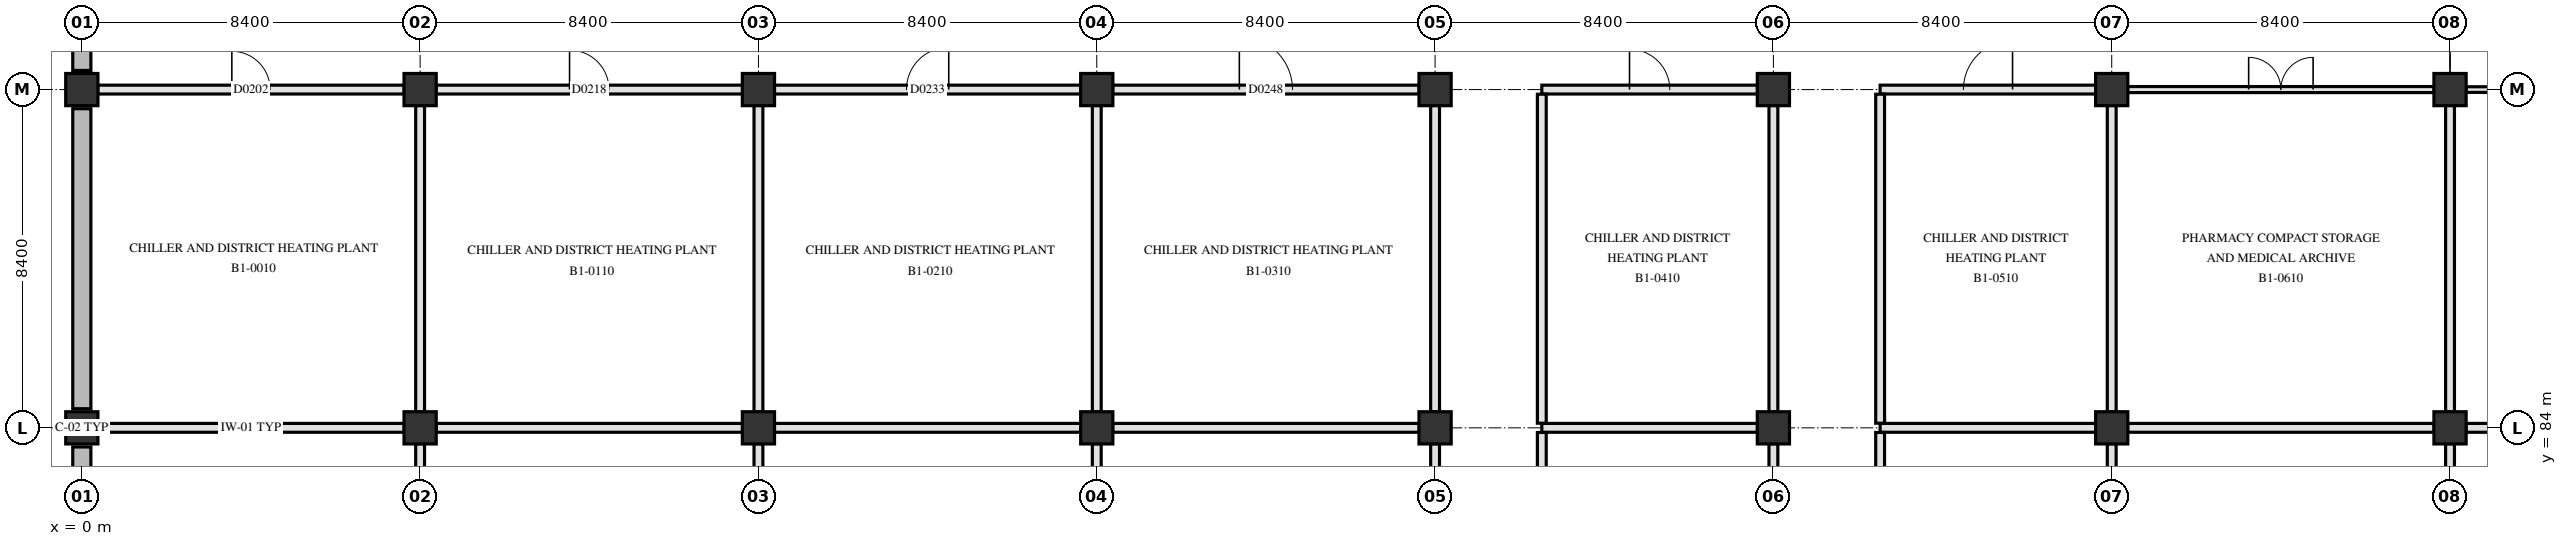
"""IFC4 building model, lengths in metres.
Left out: names, types, materials, properties, quantities, classifications, styles, units other than length and angle.
Written with IfcOpenShell. Run it as: python <this file> out.ifc"""

import sys

from ifc_helpers import new_model, si_unit, direction, frame, frame_2d, origin, origin_2d, place, context, subcontext, project, spatial, rectangle, extrude, element, fill, save


model = new_model("IFC4")
c1 = context("Model", 3, precision=1e-05, world=origin(), true_north=direction((0.0, 1.0)))
c2 = subcontext(c1, "Body", "Model", "MODEL_VIEW")
j1 = project(units=[si_unit("LENGTHUNIT", "METRE"), si_unit("PLANEANGLEUNIT", "RADIAN")], contexts=[c1])
p1 = place(None, origin())
s1 = spatial("IfcSite", under=j1, at=p1, CompositionType="ELEMENT")
p2 = place(p1, origin())
s2 = spatial("IfcBuilding", under=s1, at=p2, CompositionType="ELEMENT")
p3 = place(p2, frame((0.0, 0.0, -5.4)))
s3 = spatial("IfcBuildingStorey", under=s2, at=p3, CompositionType="ELEMENT", Elevation=-5.4)
for number, where, z_axis, x_axis in (
    (1, (0.0, 84.0, 0.0), (0.0, 0.0, 1.0), (1.0, 0.0, 0.0)),
    (2, (0.0, 92.4, 0.0), (0.0, 0.0, 1.0), (1.0, 0.0, 0.0)),
    (3, (8.4, 84.0, 0.0), (0.0, 0.0, 1.0), (1.0, 0.0, 0.0)),
    (4, (8.4, 92.4, 0.0), (0.0, 0.0, 1.0), (1.0, 0.0, 0.0)),
    (5, (16.8, 84.0, 0.0), (0.0, 0.0, 1.0), (1.0, 0.0, 0.0)),
    (6, (16.8, 92.4, 0.0), (0.0, 0.0, 1.0), (1.0, 0.0, 0.0)),
    (7, (25.2, 84.0, 0.0), (0.0, 0.0, 1.0), (1.0, 0.0, 0.0)),
    (8, (25.2, 92.4, 0.0), (0.0, 0.0, 1.0), (1.0, 0.0, 0.0)),
    (9, (33.6, 84.0, 0.0), (0.0, 0.0, 1.0), (1.0, 0.0, 0.0)),
    (10, (33.6, 92.4, 0.0), (0.0, 0.0, 1.0), (1.0, 0.0, 0.0)),
    (11, (42.0, 84.0, 0.0), (0.0, 0.0, 1.0), (1.0, 0.0, 0.0)),
    (12, (42.0, 92.4, 0.0), (0.0, 0.0, 1.0), (1.0, 0.0, 0.0)),
    (13, (50.4, 84.0, 0.0), (0.0, 0.0, 1.0), (1.0, 0.0, 0.0)),
    (14, (50.4, 92.4, 0.0), (0.0, 0.0, 1.0), (1.0, 0.0, 0.0)),
    (15, (58.8, 84.0, 0.0), (0.0, 0.0, 1.0), (1.0, 0.0, 0.0)),
    (16, (58.8, 92.4, 0.0), (0.0, 0.0, 1.0), (1.0, 0.0, 0.0)),
):
    element("IfcColumn", number, at=place(p3, frame(where, z_axis=z_axis, x_axis=x_axis)), inside=s3, PredefinedType="COLUMN", context=c2, shape_type="SweptSolid", body=[
        extrude(rectangle(XDim=0.8, YDim=0.8, at=origin_2d()), origin(), (0.0, 0.0, 1.0), 5.4),
    ])
for number, where, z_axis, x_axis in (
    (17, (0.0, 76.075, 0.0), (0.0, 0.0, 1.0), (0.0, 1.0, 0.0)),
    (18, (0.0, 84.475, 0.0), (0.0, 0.0, 1.0), (0.0, 1.0, 0.0)),
    (19, (0.0, 92.875, 0.0), (0.0, 0.0, 1.0), (0.0, 1.0, 0.0)),
):
    element("IfcWall", number, at=place(p3, frame(where, z_axis=z_axis, x_axis=x_axis)), inside=s3, PredefinedType="SOLIDWALL", context=c2, shape_type="SweptSolid", body=[
        extrude(rectangle(XDim=7.45, YDim=0.45, at=frame_2d((3.725, 0.0))), origin(), (0.0, 0.0, 1.0), 5.08),
    ])
p4 = place(p3, frame((0.395, 84.0, 0.0), z_axis=(0.0, 0.0, 1.0), x_axis=(1.0, 0.0, 0.0)))
e20 = element("IfcWall", 20, at=p4, inside=s3, PredefinedType="PARTITIONING", context=c2, shape_type="SweptSolid", body=[
    extrude(rectangle(XDim=7.61, YDim=0.22, at=frame_2d((3.805, 0.0))), origin(), (0.0, 0.0, 1.0), 4.42),
])
p5 = place(p3, frame((8.795, 84.0, 0.0), z_axis=(0.0, 0.0, 1.0), x_axis=(1.0, 0.0, 0.0)))
e21 = element("IfcWall", 21, at=p5, inside=s3, PredefinedType="PARTITIONING", context=c2, shape_type="SweptSolid", body=[
    extrude(rectangle(XDim=7.61, YDim=0.22, at=frame_2d((3.805, 0.0))), origin(), (0.0, 0.0, 1.0), 4.42),
])
p6 = place(p3, frame((17.195, 84.0, 0.0), z_axis=(0.0, 0.0, 1.0), x_axis=(1.0, 0.0, 0.0)))
e22 = element("IfcWall", 22, at=p6, inside=s3, PredefinedType="PARTITIONING", context=c2, shape_type="SweptSolid", body=[
    extrude(rectangle(XDim=7.61, YDim=0.22, at=frame_2d((3.805, 0.0))), origin(), (0.0, 0.0, 1.0), 4.42),
])
p7 = place(p3, frame((25.595, 84.0, 0.0), z_axis=(0.0, 0.0, 1.0), x_axis=(1.0, 0.0, 0.0)))
e23 = element("IfcWall", 23, at=p7, inside=s3, PredefinedType="PARTITIONING", context=c2, shape_type="SweptSolid", body=[
    extrude(rectangle(XDim=7.61, YDim=0.22, at=frame_2d((3.805, 0.0))), origin(), (0.0, 0.0, 1.0), 4.42),
])
for number, where, z_axis, x_axis in (
    (24, (36.25, 84.0, 0.0), (0.0, 0.0, 1.0), (1.0, 0.0, 0.0)),
    (25, (44.65, 84.0, 0.0), (0.0, 0.0, 1.0), (1.0, 0.0, 0.0)),
):
    element("IfcWall", number, at=place(p3, frame(where, z_axis=z_axis, x_axis=x_axis)), inside=s3, PredefinedType="PARTITIONING", context=c2, shape_type="SweptSolid", body=[
        extrude(rectangle(XDim=5.355, YDim=0.22, at=frame_2d((2.677, 0.0))), origin(), (0.0, 0.0, 1.0), 4.42),
    ])
p8 = place(p3, frame((50.795, 84.0, 0.0), z_axis=(0.0, 0.0, 1.0), x_axis=(1.0, 0.0, 0.0)))
e26 = element("IfcWall", 26, at=p8, inside=s3, PredefinedType="PARTITIONING", context=c2, shape_type="SweptSolid", body=[
    extrude(rectangle(XDim=7.61, YDim=0.22, at=frame_2d((3.805, 0.0))), origin(), (0.0, 0.0, 1.0), 4.42),
])
p9 = place(p3, frame((59.195, 84.0, 0.0), z_axis=(0.0, 0.0, 1.0), x_axis=(1.0, 0.0, 0.0)))
e27 = element("IfcWall", 27, at=p9, inside=s3, PredefinedType="PARTITIONING", context=c2, shape_type="SweptSolid", body=[
    extrude(rectangle(XDim=7.61, YDim=0.22, at=frame_2d((3.805, 0.0))), origin(), (0.0, 0.0, 1.0), 4.42),
])
p10 = place(p3, frame((0.395, 92.4, 0.0), z_axis=(0.0, 0.0, 1.0), x_axis=(1.0, 0.0, 0.0)))
e28 = element("IfcWall", 28, at=p10, inside=s3, PredefinedType="PARTITIONING", context=c2, shape_type="SweptSolid", body=[
    extrude(rectangle(XDim=7.61, YDim=0.22, at=frame_2d((3.805, 0.0))), origin(), (0.0, 0.0, 1.0), 4.42),
])
p11 = place(p10, frame((3.33, 0.0, 0.0)))
e29 = element("IfcOpeningElement", 29, at=p11, cuts=e28, PredefinedType="OPENING", context=c2, shape_type="SweptSolid", body=[
    extrude(rectangle(XDim=0.95, YDim=2.1, at=frame_2d((0.475, 1.05))), frame((0.0, 0.12, 0.0), z_axis=(0.0, -1.0, 0.0), x_axis=(1.0, 0.0, 0.0)), (0.0, 0.0, 1.0), 0.24),
])
p12 = place(p3, frame((8.795, 92.4, 0.0), z_axis=(0.0, 0.0, 1.0), x_axis=(1.0, 0.0, 0.0)))
e30 = element("IfcWall", 30, at=p12, inside=s3, PredefinedType="PARTITIONING", context=c2, shape_type="SweptSolid", body=[
    extrude(rectangle(XDim=7.61, YDim=0.22, at=frame_2d((3.805, 0.0))), origin(), (0.0, 0.0, 1.0), 4.42),
])
p13 = place(p12, frame((3.315, 0.0, 0.0)))
e31 = element("IfcOpeningElement", 31, at=p13, cuts=e30, PredefinedType="OPENING", context=c2, shape_type="SweptSolid", body=[
    extrude(rectangle(XDim=0.98, YDim=2.12, at=frame_2d((0.49, 1.06))), frame((0.0, 0.12, 0.0), z_axis=(0.0, -1.0, 0.0), x_axis=(1.0, 0.0, 0.0)), (0.0, 0.0, 1.0), 0.24),
])
p14 = place(p3, frame((17.195, 92.4, 0.0), z_axis=(0.0, 0.0, 1.0), x_axis=(1.0, 0.0, 0.0)))
e32 = element("IfcWall", 32, at=p14, inside=s3, PredefinedType="PARTITIONING", context=c2, shape_type="SweptSolid", body=[
    extrude(rectangle(XDim=7.61, YDim=0.22, at=frame_2d((3.805, 0.0))), origin(), (0.0, 0.0, 1.0), 4.42),
])
p15 = place(p14, frame((3.28, 0.0, 0.0)))
e33 = element("IfcOpeningElement", 33, at=p15, cuts=e32, PredefinedType="OPENING", context=c2, shape_type="SweptSolid", body=[
    extrude(rectangle(XDim=1.05, YDim=2.15, at=frame_2d((0.525, 1.075))), frame((0.0, 0.12, 0.0), z_axis=(0.0, -1.0, 0.0), x_axis=(1.0, 0.0, 0.0)), (0.0, 0.0, 1.0), 0.24),
])
p16 = place(p3, frame((25.595, 92.4, 0.0), z_axis=(0.0, 0.0, 1.0), x_axis=(1.0, 0.0, 0.0)))
e34 = element("IfcWall", 34, at=p16, inside=s3, PredefinedType="PARTITIONING", context=c2, shape_type="SweptSolid", body=[
    extrude(rectangle(XDim=7.61, YDim=0.22, at=frame_2d((3.805, 0.0))), origin(), (0.0, 0.0, 1.0), 4.42),
])
p17 = place(p16, frame((3.145, 0.0, 0.0)))
e35 = element("IfcOpeningElement", 35, at=p17, cuts=e34, PredefinedType="OPENING", context=c2, shape_type="SweptSolid", body=[
    extrude(rectangle(XDim=1.32, YDim=2.18, at=frame_2d((0.66, 1.09))), frame((0.0, 0.12, 0.0), z_axis=(0.0, -1.0, 0.0), x_axis=(1.0, 0.0, 0.0)), (0.0, 0.0, 1.0), 0.24),
])
p18 = place(p3, frame((36.25, 92.4, 0.0), z_axis=(0.0, 0.0, 1.0), x_axis=(1.0, 0.0, 0.0)))
e36 = element("IfcWall", 36, at=p18, inside=s3, PredefinedType="PARTITIONING", context=c2, shape_type="SweptSolid", body=[
    extrude(rectangle(XDim=5.355, YDim=0.22, at=frame_2d((2.677, 0.0))), origin(), (0.0, 0.0, 1.0), 4.42),
])
p19 = place(p18, frame((2.177, 0.0, 0.0)))
e37 = element("IfcOpeningElement", 37, at=p19, cuts=e36, PredefinedType="OPENING", context=c2, shape_type="SweptSolid", body=[
    extrude(rectangle(XDim=1.0, YDim=2.15, at=frame_2d((0.5, 1.075))), frame((0.0, 0.12, 0.0), z_axis=(0.0, -1.0, 0.0), x_axis=(1.0, 0.0, 0.0)), (0.0, 0.0, 1.0), 0.24),
])
p20 = place(p3, frame((44.65, 92.4, 0.0), z_axis=(0.0, 0.0, 1.0), x_axis=(1.0, 0.0, 0.0)))
e38 = element("IfcWall", 38, at=p20, inside=s3, PredefinedType="PARTITIONING", context=c2, shape_type="SweptSolid", body=[
    extrude(rectangle(XDim=5.355, YDim=0.22, at=frame_2d((2.677, 0.0))), origin(), (0.0, 0.0, 1.0), 4.42),
])
p21 = place(p20, frame((2.067, 0.0, 0.0)))
e39 = element("IfcOpeningElement", 39, at=p21, cuts=e38, PredefinedType="OPENING", context=c2, shape_type="SweptSolid", body=[
    extrude(rectangle(XDim=1.22, YDim=2.18, at=frame_2d((0.61, 1.09))), frame((0.0, 0.12, 0.0), z_axis=(0.0, -1.0, 0.0), x_axis=(1.0, 0.0, 0.0)), (0.0, 0.0, 1.0), 0.24),
])
p22 = place(p3, frame((50.795, 92.4, 0.0), z_axis=(0.0, 0.0, 1.0), x_axis=(1.0, 0.0, 0.0)))
e40 = element("IfcWall", 40, at=p22, inside=s3, PredefinedType="PARTITIONING", context=c2, shape_type="SweptSolid", body=[
    extrude(rectangle(XDim=7.61, YDim=0.15, at=frame_2d((3.805, 0.0))), origin(), (0.0, 0.0, 1.0), 4.42),
])
p23 = place(p22, frame((3.005, 0.0, 0.0)))
e41 = element("IfcOpeningElement", 41, at=p23, cuts=e40, PredefinedType="OPENING", context=c2, shape_type="SweptSolid", body=[
    extrude(rectangle(XDim=1.6, YDim=2.25, at=frame_2d((0.8, 1.125))), frame((0.0, 0.085, 0.0), z_axis=(0.0, -1.0, 0.0), x_axis=(1.0, 0.0, 0.0)), (0.0, 0.0, 1.0), 0.17),
])
p24 = place(p3, frame((59.195, 92.4, 0.0), z_axis=(0.0, 0.0, 1.0), x_axis=(1.0, 0.0, 0.0)))
e42 = element("IfcWall", 42, at=p24, inside=s3, PredefinedType="PARTITIONING", context=c2, shape_type="SweptSolid", body=[
    extrude(rectangle(XDim=7.56, YDim=0.14, at=frame_2d((3.78, 0.0))), origin(), (0.0, 0.0, 1.0), 4.42),
])
p25 = place(p24, frame((3.13, 0.0, 0.0)))
e43 = element("IfcOpeningElement", 43, at=p25, cuts=e42, PredefinedType="OPENING", context=c2, shape_type="SweptSolid", body=[
    extrude(rectangle(XDim=1.3, YDim=2.2, at=frame_2d((0.65, 1.1))), frame((0.0, 0.08, 0.0), z_axis=(0.0, -1.0, 0.0), x_axis=(1.0, 0.0, 0.0)), (0.0, 0.0, 1.0), 0.16),
])
p26 = place(p3, frame((8.4, 78.315, 0.0), z_axis=(0.0, 0.0, 1.0), x_axis=(0.0, 1.0, 0.0)))
e44 = element("IfcWall", 44, at=p26, inside=s3, PredefinedType="PARTITIONING", context=c2, shape_type="SweptSolid", body=[
    extrude(rectangle(XDim=5.29, YDim=0.22, at=frame_2d((2.645, 0.0))), origin(), (0.0, 0.0, 1.0), 4.47),
])
p27 = place(p3, frame((8.4, 84.395, 0.0), z_axis=(0.0, 0.0, 1.0), x_axis=(0.0, 1.0, 0.0)))
e45 = element("IfcWall", 45, at=p27, inside=s3, PredefinedType="PARTITIONING", context=c2, shape_type="SweptSolid", body=[
    extrude(rectangle(XDim=7.61, YDim=0.22, at=frame_2d((3.805, 0.0))), origin(), (0.0, 0.0, 1.0), 4.47),
])
p28 = place(p3, frame((16.8, 78.315, 0.0), z_axis=(0.0, 0.0, 1.0), x_axis=(0.0, 1.0, 0.0)))
e46 = element("IfcWall", 46, at=p28, inside=s3, PredefinedType="PARTITIONING", context=c2, shape_type="SweptSolid", body=[
    extrude(rectangle(XDim=5.29, YDim=0.22, at=frame_2d((2.645, 0.0))), origin(), (0.0, 0.0, 1.0), 4.47),
])
p29 = place(p3, frame((16.8, 84.395, 0.0), z_axis=(0.0, 0.0, 1.0), x_axis=(0.0, 1.0, 0.0)))
e47 = element("IfcWall", 47, at=p29, inside=s3, PredefinedType="PARTITIONING", context=c2, shape_type="SweptSolid", body=[
    extrude(rectangle(XDim=7.61, YDim=0.22, at=frame_2d((3.805, 0.0))), origin(), (0.0, 0.0, 1.0), 4.47),
])
p30 = place(p3, frame((25.2, 78.315, 0.0), z_axis=(0.0, 0.0, 1.0), x_axis=(0.0, 1.0, 0.0)))
e48 = element("IfcWall", 48, at=p30, inside=s3, PredefinedType="PARTITIONING", context=c2, shape_type="SweptSolid", body=[
    extrude(rectangle(XDim=5.29, YDim=0.22, at=frame_2d((2.645, 0.0))), origin(), (0.0, 0.0, 1.0), 4.47),
])
p31 = place(p3, frame((25.2, 84.395, 0.0), z_axis=(0.0, 0.0, 1.0), x_axis=(0.0, 1.0, 0.0)))
e49 = element("IfcWall", 49, at=p31, inside=s3, PredefinedType="PARTITIONING", context=c2, shape_type="SweptSolid", body=[
    extrude(rectangle(XDim=7.61, YDim=0.22, at=frame_2d((3.805, 0.0))), origin(), (0.0, 0.0, 1.0), 4.47),
])
p32 = place(p3, frame((33.6, 78.315, 0.0), z_axis=(0.0, 0.0, 1.0), x_axis=(0.0, 1.0, 0.0)))
e50 = element("IfcWall", 50, at=p32, inside=s3, PredefinedType="PARTITIONING", context=c2, shape_type="SweptSolid", body=[
    extrude(rectangle(XDim=5.29, YDim=0.22, at=frame_2d((2.645, 0.0))), origin(), (0.0, 0.0, 1.0), 4.47),
])
p33 = place(p3, frame((33.6, 84.395, 0.0), z_axis=(0.0, 0.0, 1.0), x_axis=(0.0, 1.0, 0.0)))
e51 = element("IfcWall", 51, at=p33, inside=s3, PredefinedType="PARTITIONING", context=c2, shape_type="SweptSolid", body=[
    extrude(rectangle(XDim=7.61, YDim=0.22, at=frame_2d((3.805, 0.0))), origin(), (0.0, 0.0, 1.0), 4.47),
])
p34 = place(p3, frame((36.25, 78.315, 0.0), z_axis=(0.0, 0.0, 1.0), x_axis=(0.0, 1.0, 0.0)))
e52 = element("IfcWall", 52, at=p34, inside=s3, PredefinedType="PARTITIONING", context=c2, shape_type="SweptSolid", body=[
    extrude(rectangle(XDim=5.57, YDim=0.22, at=frame_2d((2.785, 0.0))), origin(), (0.0, 0.0, 1.0), 4.42),
])
p35 = place(p3, frame((36.25, 84.115, 0.0), z_axis=(0.0, 0.0, 1.0), x_axis=(0.0, 1.0, 0.0)))
e53 = element("IfcWall", 53, at=p35, inside=s3, PredefinedType="PARTITIONING", context=c2, shape_type="SweptSolid", body=[
    extrude(rectangle(XDim=8.17, YDim=0.22, at=frame_2d((4.085, 0.0))), origin(), (0.0, 0.0, 1.0), 4.42),
])
p36 = place(p3, frame((42.0, 78.315, 0.0), z_axis=(0.0, 0.0, 1.0), x_axis=(0.0, 1.0, 0.0)))
e54 = element("IfcWall", 54, at=p36, inside=s3, PredefinedType="PARTITIONING", context=c2, shape_type="SweptSolid", body=[
    extrude(rectangle(XDim=5.29, YDim=0.22, at=frame_2d((2.645, 0.0))), origin(), (0.0, 0.0, 1.0), 4.47),
])
p37 = place(p3, frame((42.0, 84.395, 0.0), z_axis=(0.0, 0.0, 1.0), x_axis=(0.0, 1.0, 0.0)))
e55 = element("IfcWall", 55, at=p37, inside=s3, PredefinedType="PARTITIONING", context=c2, shape_type="SweptSolid", body=[
    extrude(rectangle(XDim=7.61, YDim=0.22, at=frame_2d((3.805, 0.0))), origin(), (0.0, 0.0, 1.0), 4.47),
])
p38 = place(p3, frame((44.65, 78.315, 0.0), z_axis=(0.0, 0.0, 1.0), x_axis=(0.0, 1.0, 0.0)))
e56 = element("IfcWall", 56, at=p38, inside=s3, PredefinedType="PARTITIONING", context=c2, shape_type="SweptSolid", body=[
    extrude(rectangle(XDim=5.57, YDim=0.22, at=frame_2d((2.785, 0.0))), origin(), (0.0, 0.0, 1.0), 4.42),
])
p39 = place(p3, frame((44.65, 84.115, 0.0), z_axis=(0.0, 0.0, 1.0), x_axis=(0.0, 1.0, 0.0)))
e57 = element("IfcWall", 57, at=p39, inside=s3, PredefinedType="PARTITIONING", context=c2, shape_type="SweptSolid", body=[
    extrude(rectangle(XDim=8.17, YDim=0.22, at=frame_2d((4.085, 0.0))), origin(), (0.0, 0.0, 1.0), 4.42),
])
p40 = place(p3, frame((50.4, 78.315, 0.0), z_axis=(0.0, 0.0, 1.0), x_axis=(0.0, 1.0, 0.0)))
e58 = element("IfcWall", 58, at=p40, inside=s3, PredefinedType="PARTITIONING", context=c2, shape_type="SweptSolid", body=[
    extrude(rectangle(XDim=5.29, YDim=0.22, at=frame_2d((2.645, 0.0))), origin(), (0.0, 0.0, 1.0), 4.47),
])
p41 = place(p3, frame((50.4, 84.395, 0.0), z_axis=(0.0, 0.0, 1.0), x_axis=(0.0, 1.0, 0.0)))
e59 = element("IfcWall", 59, at=p41, inside=s3, PredefinedType="PARTITIONING", context=c2, shape_type="SweptSolid", body=[
    extrude(rectangle(XDim=7.61, YDim=0.22, at=frame_2d((3.805, 0.0))), origin(), (0.0, 0.0, 1.0), 4.47),
])
p42 = place(p3, frame((58.8, 78.315, 0.0), z_axis=(0.0, 0.0, 1.0), x_axis=(0.0, 1.0, 0.0)))
e60 = element("IfcWall", 60, at=p42, inside=s3, PredefinedType="PARTITIONING", context=c2, shape_type="SweptSolid", body=[
    extrude(rectangle(XDim=5.29, YDim=0.22, at=frame_2d((2.645, 0.0))), origin(), (0.0, 0.0, 1.0), 4.47),
])
p43 = place(p3, frame((58.8, 84.395, 0.0), z_axis=(0.0, 0.0, 1.0), x_axis=(0.0, 1.0, 0.0)))
e61 = element("IfcWall", 61, at=p43, inside=s3, PredefinedType="PARTITIONING", context=c2, shape_type="SweptSolid", body=[
    extrude(rectangle(XDim=7.61, YDim=0.22, at=frame_2d((3.805, 0.0))), origin(), (0.0, 0.0, 1.0), 4.47),
])
p44 = place(p11, origin())
e62 = element("IfcDoor", 62, at=p44, inside=s3, OperationType="SINGLE_SWING_LEFT", PredefinedType="DOOR", context=c2, shape_type="SweptSolid", body=[
    extrude(rectangle(XDim=0.95, YDim=2.1, at=frame_2d((0.475, 1.05))), frame((0.0, 0.025, 0.0), z_axis=(0.0, -1.0, 0.0), x_axis=(1.0, 0.0, 0.0)), (0.0, 0.0, 1.0), 0.05),
])
fill(e29, e62)
p45 = place(p13, origin())
e63 = element("IfcDoor", 63, at=p45, inside=s3, OperationType="SINGLE_SWING_LEFT", PredefinedType="DOOR", context=c2, shape_type="SweptSolid", body=[
    extrude(rectangle(XDim=0.98, YDim=2.12, at=frame_2d((0.49, 1.06))), frame((0.0, 0.025, 0.0), z_axis=(0.0, -1.0, 0.0), x_axis=(1.0, 0.0, 0.0)), (0.0, 0.0, 1.0), 0.05),
])
fill(e31, e63)
p46 = place(p15, origin())
e64 = element("IfcDoor", 64, at=p46, inside=s3, OperationType="SINGLE_SWING_RIGHT", PredefinedType="DOOR", context=c2, shape_type="SweptSolid", body=[
    extrude(rectangle(XDim=1.05, YDim=2.15, at=frame_2d((0.525, 1.075))), frame((0.0, 0.025, 0.0), z_axis=(0.0, -1.0, 0.0), x_axis=(1.0, 0.0, 0.0)), (0.0, 0.0, 1.0), 0.05),
])
fill(e33, e64)
p47 = place(p17, origin())
e65 = element("IfcDoor", 65, at=p47, inside=s3, OperationType="SINGLE_SWING_LEFT", PredefinedType="DOOR", context=c2, shape_type="SweptSolid", body=[
    extrude(rectangle(XDim=1.32, YDim=2.18, at=frame_2d((0.66, 1.09))), frame((0.0, 0.025, 0.0), z_axis=(0.0, -1.0, 0.0), x_axis=(1.0, 0.0, 0.0)), (0.0, 0.0, 1.0), 0.05),
])
fill(e35, e65)
p48 = place(p19, origin())
e66 = element("IfcDoor", 66, at=p48, inside=s3, OperationType="SINGLE_SWING_LEFT", PredefinedType="DOOR", context=c2, shape_type="SweptSolid", body=[
    extrude(rectangle(XDim=1.0, YDim=2.15, at=frame_2d((0.5, 1.075))), frame((0.0, 0.025, 0.0), z_axis=(0.0, -1.0, 0.0), x_axis=(1.0, 0.0, 0.0)), (0.0, 0.0, 1.0), 0.05),
])
fill(e37, e66)
p49 = place(p21, origin())
e67 = element("IfcDoor", 67, at=p49, inside=s3, OperationType="SINGLE_SWING_RIGHT", PredefinedType="DOOR", context=c2, shape_type="SweptSolid", body=[
    extrude(rectangle(XDim=1.22, YDim=2.18, at=frame_2d((0.61, 1.09))), frame((0.0, 0.025, 0.0), z_axis=(0.0, -1.0, 0.0), x_axis=(1.0, 0.0, 0.0)), (0.0, 0.0, 1.0), 0.05),
])
fill(e39, e67)
p50 = place(p23, origin())
e68 = element("IfcDoor", 68, at=p50, inside=s3, OperationType="DOUBLE_SWING_LEFT", PredefinedType="DOOR", context=c2, shape_type="SweptSolid", body=[
    extrude(rectangle(XDim=1.6, YDim=2.25, at=frame_2d((0.8, 1.125))), frame((0.0, 0.025, 0.0), z_axis=(0.0, -1.0, 0.0), x_axis=(1.0, 0.0, 0.0)), (0.0, 0.0, 1.0), 0.05),
])
fill(e41, e68)
save(model, sys.argv[1])
